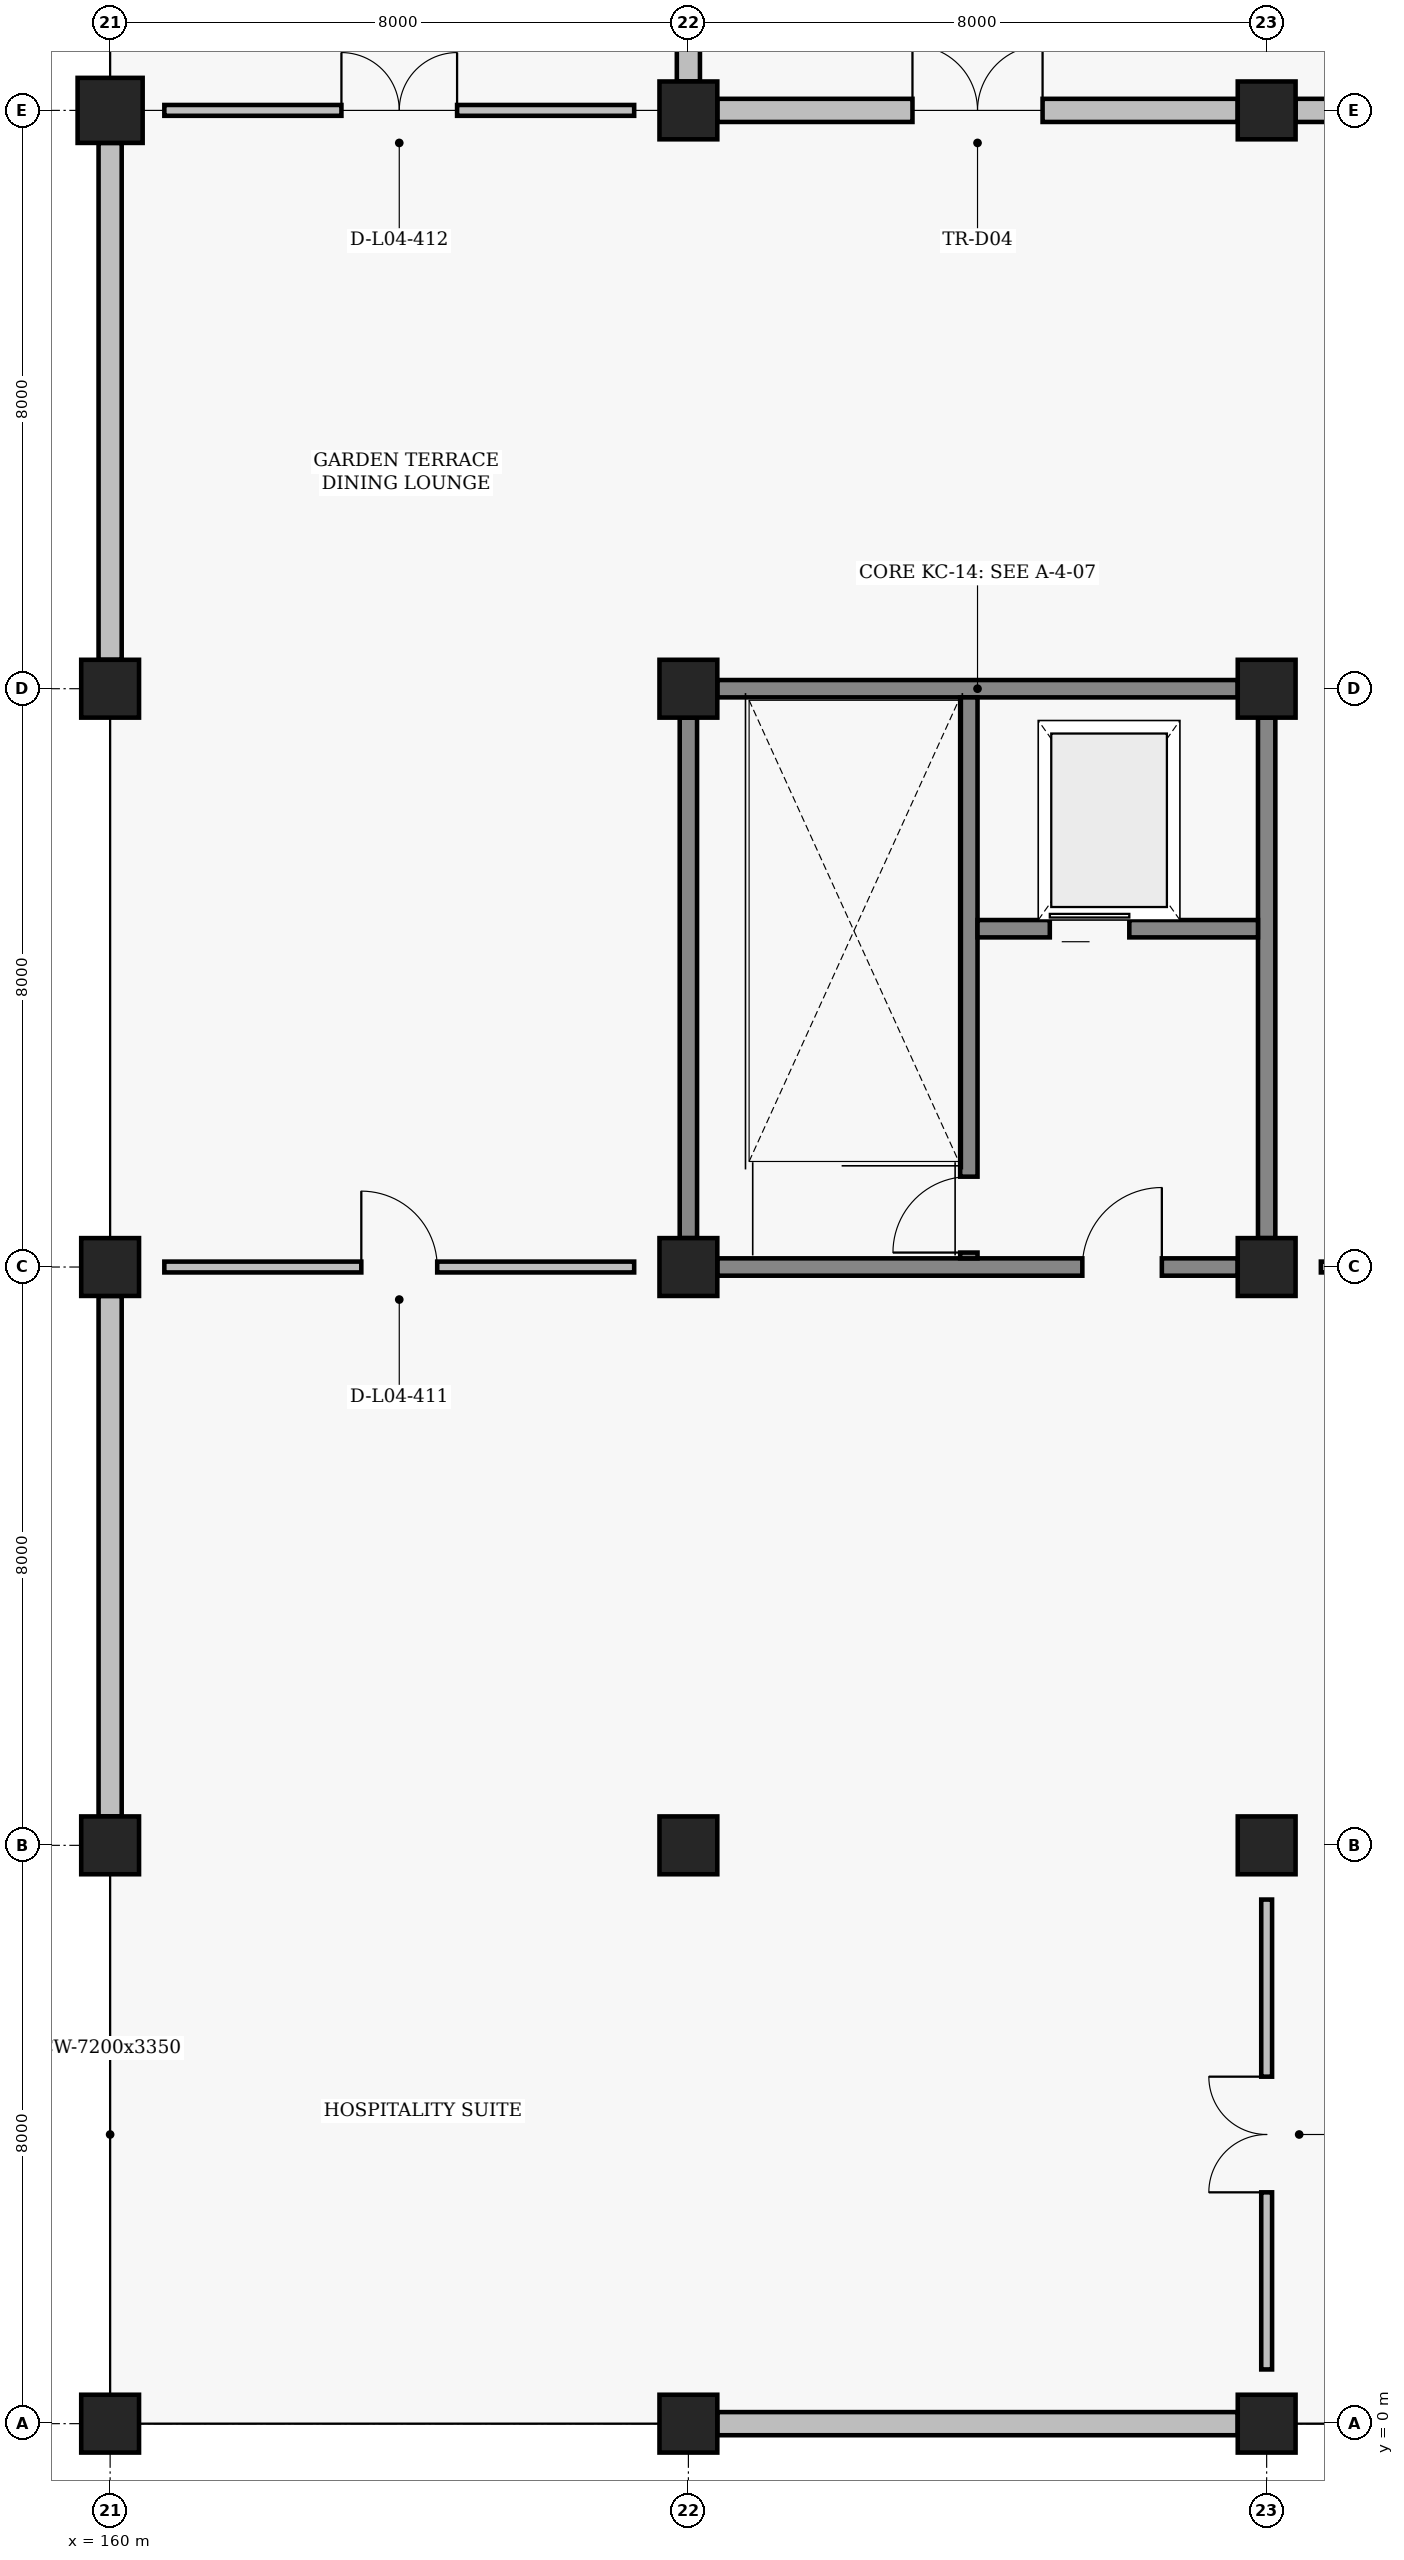
"""IFC4 building model, lengths in metres.
Left out: names, types, materials, properties, quantities, classifications, styles, units other than length and angle.
Written with IfcOpenShell. Run it as: python <this file> out.ifc"""

import sys

from ifc_helpers import new_model, si_unit, direction, frame, frame_2d, origin, origin_2d, place, context, subcontext, project, spatial, rectangle, extrude, element, fill, save


model = new_model("IFC4")
c1 = context("Model", 3, precision=1e-05, world=origin(), true_north=direction((0.0, 1.0)))
c2 = subcontext(c1, "Body", "Model", "MODEL_VIEW")
j1 = project(units=[si_unit("LENGTHUNIT", "METRE"), si_unit("PLANEANGLEUNIT", "RADIAN")], contexts=[c1])
p1 = place(None, origin())
s1 = spatial("IfcSite", under=j1, at=p1, CompositionType="ELEMENT")
p2 = place(p1, origin())
s2 = spatial("IfcBuilding", under=s1, at=p2, CompositionType="ELEMENT")
p3 = place(p2, frame((0.0, 0.0, 14.4)))
s3 = spatial("IfcBuildingStorey", under=s2, at=p3, CompositionType="ELEMENT", Elevation=14.4)
for number, where, z_axis, x_axis in (
    (1, (160.0, 0.0, 0.0), (0.0, 0.0, 1.0), (1.0, 0.0, 0.0)),
    (2, (160.0, 8.0, 0.0), (0.0, 0.0, 1.0), (1.0, 0.0, 0.0)),
    (3, (160.0, 16.0, 0.0), (0.0, 0.0, 1.0), (1.0, 0.0, 0.0)),
    (4, (160.0, 24.0, 0.0), (0.0, 0.0, 1.0), (1.0, 0.0, 0.0)),
):
    element("IfcColumn", number, at=place(p3, frame(where, z_axis=z_axis, x_axis=x_axis)), inside=s3, PredefinedType="COLUMN", context=c2, shape_type="SweptSolid", body=[
        extrude(rectangle(XDim=0.8, YDim=0.8, at=origin_2d()), origin(), (0.0, 0.0, 1.0), 4.2),
    ])
p4 = place(p3, frame((160.0, 32.0, 0.0), z_axis=(0.0, 0.0, 1.0), x_axis=(1.0, 0.0, 0.0)))
e5 = element("IfcColumn", 5, at=p4, inside=s3, PredefinedType="COLUMN", context=c2, shape_type="SweptSolid", body=[
    extrude(rectangle(XDim=0.9, YDim=0.9, at=origin_2d()), origin(), (0.0, 0.0, 1.0), 4.2),
])
for number, where, z_axis, x_axis in (
    (6, (168.0, 0.0, 0.0), (0.0, 0.0, 1.0), (1.0, 0.0, 0.0)),
    (7, (168.0, 8.0, 0.0), (0.0, 0.0, 1.0), (1.0, 0.0, 0.0)),
    (8, (168.0, 16.0, 0.0), (0.0, 0.0, 1.0), (1.0, 0.0, 0.0)),
    (9, (168.0, 24.0, 0.0), (0.0, 0.0, 1.0), (1.0, 0.0, 0.0)),
    (10, (168.0, 32.0, 0.0), (0.0, 0.0, 1.0), (1.0, 0.0, 0.0)),
    (11, (176.0, 0.0, 0.0), (0.0, 0.0, 1.0), (1.0, 0.0, 0.0)),
    (12, (176.0, 8.0, 0.0), (0.0, 0.0, 1.0), (1.0, 0.0, 0.0)),
    (13, (176.0, 16.0, 0.0), (0.0, 0.0, 1.0), (1.0, 0.0, 0.0)),
    (14, (176.0, 24.0, 0.0), (0.0, 0.0, 1.0), (1.0, 0.0, 0.0)),
    (15, (176.0, 32.0, 0.0), (0.0, 0.0, 1.0), (1.0, 0.0, 0.0)),
):
    element("IfcColumn", number, at=place(p3, frame(where, z_axis=z_axis, x_axis=x_axis)), inside=s3, PredefinedType="COLUMN", context=c2, shape_type="SweptSolid", body=[
        extrude(rectangle(XDim=0.8, YDim=0.8, at=origin_2d()), origin(), (0.0, 0.0, 1.0), 4.2),
    ])
p5 = place(p3, frame((160.0, 8.4, 0.0), z_axis=(0.0, 0.0, 1.0), x_axis=(0.0, 1.0, 0.0)))
e16 = element("IfcWall", 16, at=p5, inside=s3, PredefinedType="SOLIDWALL", context=c2, shape_type="SweptSolid", body=[
    extrude(rectangle(XDim=7.2, YDim=0.32, at=frame_2d((3.6, 0.0))), origin(), (0.0, 0.0, 1.0), 3.35),
])
p6 = place(p3, frame((160.0, 24.4, 0.0), z_axis=(0.0, 0.0, 1.0), x_axis=(0.0, 1.0, 0.0)))
e17 = element("IfcWall", 17, at=p6, inside=s3, PredefinedType="SOLIDWALL", context=c2, shape_type="SweptSolid", body=[
    extrude(rectangle(XDim=7.15, YDim=0.32, at=frame_2d((3.575, 0.0))), origin(), (0.0, 0.0, 1.0), 3.35),
])
p7 = place(p3, frame((168.0, 32.4, 0.0), z_axis=(0.0, 0.0, 1.0), x_axis=(0.0, 1.0, 0.0)))
e18 = element("IfcWall", 18, at=p7, inside=s3, PredefinedType="SOLIDWALL", context=c2, shape_type="SweptSolid", body=[
    extrude(rectangle(XDim=7.2, YDim=0.32, at=frame_2d((3.6, 0.0))), origin(), (0.0, 0.0, 1.0), 3.35),
])
p8 = place(p7, frame((2.6, 0.0, 0.0)))
e19 = element("IfcOpeningElement", 19, at=p8, cuts=e18, PredefinedType="OPENING", context=c2, shape_type="SweptSolid", body=[
    extrude(rectangle(XDim=2.0, YDim=2.4, at=frame_2d((1.0, 1.2))), frame((0.0, 0.17, 0.0), z_axis=(0.0, -1.0, 0.0), x_axis=(1.0, 0.0, 0.0)), (0.0, 0.0, 1.0), 0.34),
])
p9 = place(p3, frame((168.4, 0.0, 0.0), z_axis=(0.0, 0.0, 1.0), x_axis=(1.0, 0.0, 0.0)))
e20 = element("IfcWall", 20, at=p9, inside=s3, PredefinedType="SOLIDWALL", context=c2, shape_type="SweptSolid", body=[
    extrude(rectangle(XDim=7.2, YDim=0.32, at=frame_2d((3.6, 0.0))), origin(), (0.0, 0.0, 1.0), 3.35),
])
p10 = place(p3, frame((168.4, 32.0, 0.0), z_axis=(0.0, 0.0, 1.0), x_axis=(1.0, 0.0, 0.0)))
e21 = element("IfcWall", 21, at=p10, inside=s3, PredefinedType="SOLIDWALL", context=c2, shape_type="SweptSolid", body=[
    extrude(rectangle(XDim=7.2, YDim=0.32, at=frame_2d((3.6, 0.0))), origin(), (0.0, 0.0, 1.0), 3.35),
])
p11 = place(p10, frame((2.7, 0.0, 0.0)))
e22 = element("IfcOpeningElement", 22, at=p11, cuts=e21, PredefinedType="OPENING", context=c2, shape_type="SweptSolid", body=[
    extrude(rectangle(XDim=1.8, YDim=2.3, at=frame_2d((0.9, 1.15))), frame((0.0, 0.17, 0.0), z_axis=(0.0, -1.0, 0.0), x_axis=(1.0, 0.0, 0.0)), (0.0, 0.0, 1.0), 0.34),
])
p12 = place(p3, frame((176.4, 32.0, 0.0), z_axis=(0.0, 0.0, 1.0), x_axis=(1.0, 0.0, 0.0)))
e23 = element("IfcWall", 23, at=p12, inside=s3, PredefinedType="SOLIDWALL", context=c2, shape_type="SweptSolid", body=[
    extrude(rectangle(XDim=7.2, YDim=0.32, at=frame_2d((3.6, 0.0))), origin(), (0.0, 0.0, 1.0), 3.35),
])
p13 = place(p12, frame((2.7, 0.0, 0.0)))
e24 = element("IfcOpeningElement", 24, at=p13, cuts=e23, PredefinedType="OPENING", context=c2, shape_type="SweptSolid", body=[
    extrude(rectangle(XDim=1.8, YDim=2.3, at=frame_2d((0.9, 1.15))), frame((0.0, 0.17, 0.0), z_axis=(0.0, -1.0, 0.0), x_axis=(1.0, 0.0, 0.0)), (0.0, 0.0, 1.0), 0.34),
])
p14 = place(p3, frame((168.4, 16.0, 0.0), z_axis=(0.0, 0.0, 1.0), x_axis=(1.0, 0.0, 0.0)))
e25 = element("IfcWall", 25, at=p14, inside=s3, PredefinedType="SHEAR", context=c2, shape_type="SweptSolid", body=[
    extrude(rectangle(XDim=7.2, YDim=0.24, at=frame_2d((3.6, 0.0))), origin(), (0.0, 0.0, 1.0), 3.37),
])
p15 = place(p14, frame((5.05, 0.0, 0.0)))
e26 = element("IfcOpeningElement", 26, at=p15, cuts=e25, PredefinedType="OPENING", context=c2, shape_type="SweptSolid", body=[
    extrude(rectangle(XDim=1.1, YDim=2.2, at=frame_2d((0.55, 1.1))), frame((0.0, 0.13, 0.0), z_axis=(0.0, -1.0, 0.0), x_axis=(1.0, 0.0, 0.0)), (0.0, 0.0, 1.0), 0.26),
])
for number, where, z_axis, x_axis in (
    (27, (168.4, 24.0, 0.0), (0.0, 0.0, 1.0), (1.0, 0.0, 0.0)),
    (28, (168.0, 16.4, 0.0), (0.0, 0.0, 1.0), (0.0, 1.0, 0.0)),
    (29, (176.0, 16.4, 0.0), (0.0, 0.0, 1.0), (0.0, 1.0, 0.0)),
):
    element("IfcWall", number, at=place(p3, frame(where, z_axis=z_axis, x_axis=x_axis)), inside=s3, PredefinedType="SHEAR", context=c2, shape_type="SweptSolid", body=[
        extrude(rectangle(XDim=7.2, YDim=0.24, at=frame_2d((3.6, 0.0))), origin(), (0.0, 0.0, 1.0), 3.37),
    ])
p16 = place(p3, frame((171.88, 16.12, 0.0), z_axis=(0.0, 0.0, 1.0), x_axis=(0.0, 1.0, 0.0)))
e30 = element("IfcWall", 30, at=p16, inside=s3, PredefinedType="SHEAR", context=c2, shape_type="SweptSolid", body=[
    extrude(rectangle(XDim=7.76, YDim=0.24, at=frame_2d((3.88, 0.0))), origin(), (0.0, 0.0, 1.0), 3.47),
])
p17 = place(p16, frame((0.08, 0.0, 0.0)))
e31 = element("IfcOpeningElement", 31, at=p17, cuts=e30, PredefinedType="OPENING", context=c2, shape_type="SweptSolid", body=[
    extrude(rectangle(XDim=1.05, YDim=2.15, at=frame_2d((0.525, 1.075))), frame((0.0, 0.13, 0.0), z_axis=(0.0, -1.0, 0.0), x_axis=(1.0, 0.0, 0.0)), (0.0, 0.0, 1.0), 0.26),
])
p18 = place(p3, frame((172.0, 20.68, 0.0), z_axis=(0.0, 0.0, 1.0), x_axis=(1.0, 0.0, 0.0)))
e32 = element("IfcWall", 32, at=p18, inside=s3, PredefinedType="SHEAR", context=c2, shape_type="SweptSolid", body=[
    extrude(rectangle(XDim=3.88, YDim=0.24, at=frame_2d((1.94, 0.0))), origin(), (0.0, 0.0, 1.0), 3.37),
])
p19 = place(p18, frame((1.0, 0.0, 0.0)))
e33 = element("IfcOpeningElement", 33, at=p19, cuts=e32, PredefinedType="OPENING", context=c2, shape_type="SweptSolid", body=[
    extrude(rectangle(XDim=1.1, YDim=2.15, at=frame_2d((0.55, 1.075))), frame((0.0, 0.13, 0.0), z_axis=(0.0, -1.0, 0.0), x_axis=(1.0, 0.0, 0.0)), (0.0, 0.0, 1.0), 0.26),
])
p20 = place(p3, frame((160.75, 16.0, 0.0), z_axis=(0.0, 0.0, 1.0), x_axis=(1.0, 0.0, 0.0)))
e34 = element("IfcWall", 34, at=p20, inside=s3, PredefinedType="PARTITIONING", context=c2, shape_type="SweptSolid", body=[
    extrude(rectangle(XDim=6.5, YDim=0.15, at=frame_2d((3.25, 0.0))), origin(), (0.0, 0.0, 1.0), 3.47),
])
p21 = place(p20, frame((2.725, 0.0, 0.0)))
e35 = element("IfcOpeningElement", 35, at=p21, cuts=e34, PredefinedType="OPENING", context=c2, shape_type="SweptSolid", body=[
    extrude(rectangle(XDim=1.05, YDim=2.15, at=frame_2d((0.525, 1.075))), frame((0.0, 0.085, 0.0), z_axis=(0.0, -1.0, 0.0), x_axis=(1.0, 0.0, 0.0)), (0.0, 0.0, 1.0), 0.17),
])
p22 = place(p3, frame((160.75, 32.0, 0.0), z_axis=(0.0, 0.0, 1.0), x_axis=(1.0, 0.0, 0.0)))
e36 = element("IfcWall", 36, at=p22, inside=s3, PredefinedType="PARTITIONING", context=c2, shape_type="SweptSolid", body=[
    extrude(rectangle(XDim=6.5, YDim=0.15, at=frame_2d((3.25, 0.0))), origin(), (0.0, 0.0, 1.0), 3.47),
])
p23 = place(p22, frame((2.45, 0.0, 0.0)))
e37 = element("IfcOpeningElement", 37, at=p23, cuts=e36, PredefinedType="OPENING", context=c2, shape_type="SweptSolid", body=[
    extrude(rectangle(XDim=1.6, YDim=2.2, at=frame_2d((0.8, 1.1))), frame((0.0, 0.085, 0.0), z_axis=(0.0, -1.0, 0.0), x_axis=(1.0, 0.0, 0.0)), (0.0, 0.0, 1.0), 0.17),
])
p24 = place(p3, frame((176.0, 0.75, 0.0), z_axis=(0.0, 0.0, 1.0), x_axis=(0.0, 1.0, 0.0)))
e38 = element("IfcWall", 38, at=p24, inside=s3, PredefinedType="PARTITIONING", context=c2, shape_type="SweptSolid", body=[
    extrude(rectangle(XDim=6.5, YDim=0.15, at=frame_2d((3.25, 0.0))), origin(), (0.0, 0.0, 1.0), 3.37),
])
p25 = place(p24, frame((2.45, 0.0, 0.0)))
e39 = element("IfcOpeningElement", 39, at=p25, cuts=e38, PredefinedType="OPENING", context=c2, shape_type="SweptSolid", body=[
    extrude(rectangle(XDim=1.6, YDim=2.2, at=frame_2d((0.8, 1.1))), frame((0.0, 0.085, 0.0), z_axis=(0.0, -1.0, 0.0), x_axis=(1.0, 0.0, 0.0)), (0.0, 0.0, 1.0), 0.17),
])
p26 = place(p3, frame((176.75, 16.0, 0.0), z_axis=(0.0, 0.0, 1.0), x_axis=(1.0, 0.0, 0.0)))
e40 = element("IfcWall", 40, at=p26, inside=s3, PredefinedType="PARTITIONING", context=c2, shape_type="SweptSolid", body=[
    extrude(rectangle(XDim=6.5, YDim=0.15, at=frame_2d((3.25, 0.0))), origin(), (0.0, 0.0, 1.0), 3.47),
])
p27 = place(p26, frame((2.725, 0.0, 0.0)))
e41 = element("IfcOpeningElement", 41, at=p27, cuts=e40, PredefinedType="OPENING", context=c2, shape_type="SweptSolid", body=[
    extrude(rectangle(XDim=1.05, YDim=2.15, at=frame_2d((0.525, 1.075))), frame((0.0, 0.085, 0.0), z_axis=(0.0, -1.0, 0.0), x_axis=(1.0, 0.0, 0.0)), (0.0, 0.0, 1.0), 0.17),
])
p28 = place(p11, origin())
e42 = element("IfcDoor", 42, at=p28, inside=s3, OperationType="DOUBLE_SWING_LEFT", PredefinedType="DOOR", context=c2, shape_type="SweptSolid", body=[
    extrude(rectangle(XDim=1.8, YDim=2.3, at=frame_2d((0.9, 1.15))), frame((0.0, 0.025, 0.0), z_axis=(0.0, -1.0, 0.0), x_axis=(1.0, 0.0, 0.0)), (0.0, 0.0, 1.0), 0.05),
])
fill(e22, e42)
p29 = place(p15, origin())
e43 = element("IfcDoor", 43, at=p29, inside=s3, OperationType="SINGLE_SWING_RIGHT", PredefinedType="DOOR", context=c2, shape_type="SweptSolid", body=[
    extrude(rectangle(XDim=1.1, YDim=2.2, at=frame_2d((0.55, 1.1))), frame((0.0, 0.025, 0.0), z_axis=(0.0, -1.0, 0.0), x_axis=(1.0, 0.0, 0.0)), (0.0, 0.0, 1.0), 0.05),
])
fill(e26, e43)
p30 = place(p17, origin())
e44 = element("IfcDoor", 44, at=p30, inside=s3, OperationType="SINGLE_SWING_LEFT", PredefinedType="DOOR", context=c2, shape_type="SweptSolid", body=[
    extrude(rectangle(XDim=1.05, YDim=2.15, at=frame_2d((0.525, 1.075))), frame((0.0, 0.025, 0.0), z_axis=(0.0, -1.0, 0.0), x_axis=(1.0, 0.0, 0.0)), (0.0, 0.0, 1.0), 0.05),
])
fill(e31, e44)
p31 = place(p19, origin())
e45 = element("IfcDoor", 45, at=p31, inside=s3, OperationType="SLIDING_TO_LEFT", PredefinedType="DOOR", context=c2, shape_type="SweptSolid", body=[
    extrude(rectangle(XDim=1.1, YDim=2.15, at=frame_2d((0.55, 1.075))), frame((0.0, 0.025, 0.0), z_axis=(0.0, -1.0, 0.0), x_axis=(1.0, 0.0, 0.0)), (0.0, 0.0, 1.0), 0.05),
])
fill(e33, e45)
p32 = place(p21, origin())
e46 = element("IfcDoor", 46, at=p32, inside=s3, OperationType="SINGLE_SWING_LEFT", PredefinedType="DOOR", context=c2, shape_type="SweptSolid", body=[
    extrude(rectangle(XDim=1.05, YDim=2.15, at=frame_2d((0.525, 1.075))), frame((0.0, 0.025, 0.0), z_axis=(0.0, -1.0, 0.0), x_axis=(1.0, 0.0, 0.0)), (0.0, 0.0, 1.0), 0.05),
])
fill(e35, e46)
p33 = place(p23, origin())
e47 = element("IfcDoor", 47, at=p33, inside=s3, OperationType="DOUBLE_SWING_LEFT", PredefinedType="DOOR", context=c2, shape_type="SweptSolid", body=[
    extrude(rectangle(XDim=1.6, YDim=2.2, at=frame_2d((0.8, 1.1))), frame((0.0, 0.025, 0.0), z_axis=(0.0, -1.0, 0.0), x_axis=(1.0, 0.0, 0.0)), (0.0, 0.0, 1.0), 0.05),
])
fill(e37, e47)
p34 = place(p25, origin())
e48 = element("IfcDoor", 48, at=p34, inside=s3, OperationType="DOUBLE_SWING_LEFT", PredefinedType="DOOR", context=c2, shape_type="SweptSolid", body=[
    extrude(rectangle(XDim=1.6, YDim=2.2, at=frame_2d((0.8, 1.1))), frame((0.0, 0.025, 0.0), z_axis=(0.0, -1.0, 0.0), x_axis=(1.0, 0.0, 0.0)), (0.0, 0.0, 1.0), 0.05),
])
fill(e39, e48)
save(model, sys.argv[1])
